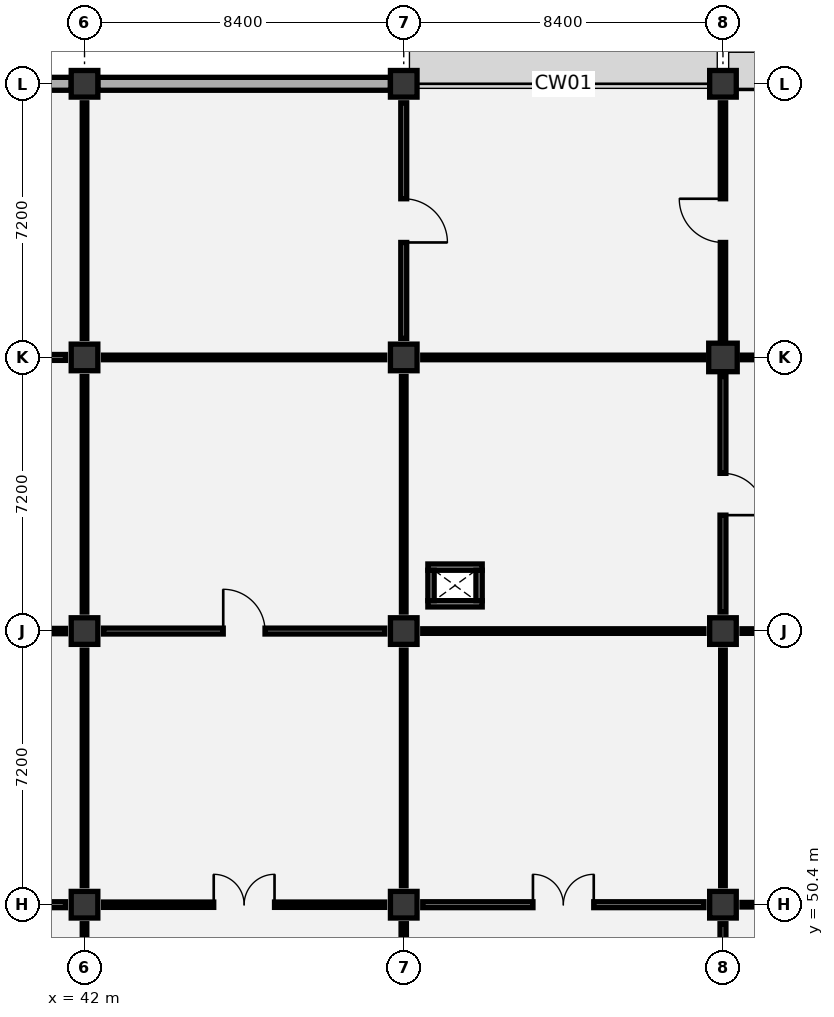
"""IFC4 building model, lengths in metres.
Left out: names, types, materials, properties, quantities, classifications, styles, units other than length and angle.
Written with IfcOpenShell. Run it as: python <this file> out.ifc"""

import sys

from ifc_helpers import new_model, si_unit, direction, frame, frame_2d, origin, origin_2d, place, context, subcontext, project, spatial, rectangle, circle, extrude, element, fill, save


model = new_model("IFC4")
c1 = context("Model", 3, precision=1e-05, world=origin(), true_north=direction((0.0, 1.0)))
c2 = subcontext(c1, "Body", "Model", "MODEL_VIEW")
j1 = project(units=[si_unit("LENGTHUNIT", "METRE"), si_unit("PLANEANGLEUNIT", "RADIAN")], contexts=[c1])
p1 = place(None, origin())
s1 = spatial("IfcSite", under=j1, at=p1, CompositionType="ELEMENT")
p2 = place(p1, origin())
s2 = spatial("IfcBuilding", under=s1, at=p2, CompositionType="ELEMENT")
p3 = place(p2, origin())
s3 = spatial("IfcBuildingStorey", under=s2, at=p3, CompositionType="ELEMENT", Elevation=0.0)
for number, where, z_axis, x_axis in (
    (1, (42.0, 50.4, 0.0), (0.0, 0.0, 1.0), (1.0, 0.0, 0.0)),
    (2, (42.0, 57.6, 0.0), (0.0, 0.0, 1.0), (1.0, 0.0, 0.0)),
    (3, (42.0, 64.8, 0.0), (0.0, 0.0, 1.0), (1.0, 0.0, 0.0)),
    (4, (42.0, 72.0, 0.0), (0.0, 0.0, 1.0), (1.0, 0.0, 0.0)),
    (5, (50.4, 50.4, 0.0), (0.0, 0.0, 1.0), (1.0, 0.0, 0.0)),
    (6, (50.4, 57.6, 0.0), (0.0, 0.0, 1.0), (1.0, 0.0, 0.0)),
    (7, (50.4, 64.8, 0.0), (0.0, 0.0, 1.0), (1.0, 0.0, 0.0)),
    (8, (50.4, 72.0, 0.0), (0.0, 0.0, 1.0), (1.0, 0.0, 0.0)),
    (9, (58.8, 50.4, 0.0), (0.0, 0.0, 1.0), (1.0, 0.0, 0.0)),
    (10, (58.8, 57.6, 0.0), (0.0, 0.0, 1.0), (1.0, 0.0, 0.0)),
):
    element("IfcColumn", number, at=place(p3, frame(where, z_axis=z_axis, x_axis=x_axis)), inside=s3, PredefinedType="COLUMN", context=c2, shape_type="SweptSolid", body=[
        extrude(rectangle(XDim=0.7, YDim=0.7, at=origin_2d()), origin(), (0.0, 0.0, 1.0), 6.0),
    ])
p4 = place(p3, frame((58.8, 64.8, 0.0), z_axis=(0.0, 0.0, 1.0), x_axis=(1.0, 0.0, 0.0)))
e11 = element("IfcColumn", 11, at=p4, inside=s3, PredefinedType="COLUMN", context=c2, shape_type="SweptSolid", body=[
    extrude(circle(Radius=0.375, at=origin_2d()), origin(), (0.0, 0.0, 1.0), 6.0),
])
p5 = place(p3, frame((58.8, 72.0, 0.0), z_axis=(0.0, 0.0, 1.0), x_axis=(1.0, 0.0, 0.0)))
e12 = element("IfcColumn", 12, at=p5, inside=s3, PredefinedType="COLUMN", context=c2, shape_type="SweptSolid", body=[
    extrude(rectangle(XDim=0.7, YDim=0.7, at=origin_2d()), origin(), (0.0, 0.0, 1.0), 6.0),
])
for number, where, z_axis, x_axis in (
    (13, (33.95, 72.0, 0.0), (0.0, 0.0, 1.0), (1.0, 0.0, 0.0)),
    (14, (42.35, 72.0, 0.0), (0.0, 0.0, 1.0), (1.0, 0.0, 0.0)),
):
    element("IfcWall", number, at=place(p3, frame(where, z_axis=z_axis, x_axis=x_axis)), inside=s3, PredefinedType="SOLIDWALL", context=c2, shape_type="SweptSolid", body=[
        extrude(rectangle(XDim=7.7, YDim=0.34, at=frame_2d((3.85, 0.0))), origin(), (0.0, 0.0, 1.0), 5.02),
    ])
p6 = place(p3, frame((59.15, 72.0, 0.0), z_axis=(0.0, 0.0, 1.0), x_axis=(1.0, 0.0, 0.0)))
e15 = element("IfcWall", 15, at=p6, inside=s3, PredefinedType="SOLIDWALL", context=c2, shape_type="SweptSolid", body=[
    extrude(rectangle(XDim=7.6, YDim=0.25, at=frame_2d((3.8, 0.0))), origin(), (0.0, 0.0, 1.0), 5.02),
])
p7 = place(p6, frame((2.9, 0.0, 0.0)))
e16 = element("IfcOpeningElement", 16, at=p7, cuts=e15, PredefinedType="OPENING", context=c2, shape_type="SweptSolid", body=[
    extrude(rectangle(XDim=1.8, YDim=2.35, at=frame_2d((0.9, 1.175))), frame((0.0, 0.135, 0.0), z_axis=(0.0, -1.0, 0.0), x_axis=(1.0, 0.0, 0.0)), (0.0, 0.0, 1.0), 0.27),
])
for number, where, z_axis, x_axis in (
    (17, (51.035, 58.317, 0.0), (0.0, 0.0, 1.0), (1.0, 0.0, 0.0)),
    (18, (51.035, 59.282, 0.0), (0.0, 0.0, 1.0), (1.0, 0.0, 0.0)),
):
    element("IfcWall", number, at=place(p3, frame(where, z_axis=z_axis, x_axis=x_axis)), inside=s3, PredefinedType="PARTITIONING", context=c2, shape_type="SweptSolid", body=[
        extrude(rectangle(XDim=1.43, YDim=0.165, at=frame_2d((0.715, 0.0))), origin(), (0.0, 0.0, 1.0), 5.675),
    ])
for number, where, z_axis, x_axis in (
    (19, (51.117, 58.4, 0.0), (0.0, 0.0, 1.0), (0.0, 1.0, 0.0)),
    (20, (52.383, 58.4, 0.0), (0.0, 0.0, 1.0), (0.0, 1.0, 0.0)),
):
    element("IfcWall", number, at=place(p3, frame(where, z_axis=z_axis, x_axis=x_axis)), inside=s3, PredefinedType="PARTITIONING", context=c2, shape_type="SweptSolid", body=[
        extrude(rectangle(XDim=0.8, YDim=0.165, at=frame_2d((0.4, 0.0))), origin(), (0.0, 0.0, 1.0), 5.675),
    ])
p8 = place(p3, frame((42.0, 43.7, 0.0), z_axis=(0.0, 0.0, 1.0), x_axis=(0.0, 1.0, 0.0)))
e21 = element("IfcWall", 21, at=p8, inside=s3, PredefinedType="PARTITIONING", context=c2, shape_type="SweptSolid", body=[
    extrude(rectangle(XDim=6.2, YDim=0.12, at=frame_2d((3.1, 0.0))), origin(), (0.0, 0.0, 1.0), 4.92),
])
p9 = place(p3, frame((34.1, 50.4, 0.0), z_axis=(0.0, 0.0, 1.0), x_axis=(1.0, 0.0, 0.0)))
e22 = element("IfcWall", 22, at=p9, inside=s3, PredefinedType="PARTITIONING", context=c2, shape_type="SweptSolid", body=[
    extrude(rectangle(XDim=7.4, YDim=0.155, at=frame_2d((3.7, 0.0))), origin(), (0.0, 0.0, 1.0), 4.87),
])
p10 = place(p9, frame((2.9, 0.0, 0.0)))
e23 = element("IfcOpeningElement", 23, at=p10, cuts=e22, PredefinedType="OPENING", context=c2, shape_type="SweptSolid", body=[
    extrude(rectangle(XDim=1.6, YDim=2.2, at=frame_2d((0.8, 1.1))), frame((0.0, 0.087, 0.0), z_axis=(0.0, -1.0, 0.0), x_axis=(1.0, 0.0, 0.0)), (0.0, 0.0, 1.0), 0.175),
])
p11 = place(p3, frame((42.0, 50.9, 0.0), z_axis=(0.0, 0.0, 1.0), x_axis=(0.0, 1.0, 0.0)))
e24 = element("IfcWall", 24, at=p11, inside=s3, PredefinedType="PARTITIONING", context=c2, shape_type="SweptSolid", body=[
    extrude(rectangle(XDim=6.2, YDim=0.12, at=frame_2d((3.1, 0.0))), origin(), (0.0, 0.0, 1.0), 5.27),
])
p12 = place(p3, frame((34.1, 57.6, 0.0), z_axis=(0.0, 0.0, 1.0), x_axis=(1.0, 0.0, 0.0)))
e25 = element("IfcWall", 25, at=p12, inside=s3, PredefinedType="PARTITIONING", context=c2, shape_type="SweptSolid", body=[
    extrude(rectangle(XDim=7.4, YDim=0.14, at=frame_2d((3.7, 0.0))), origin(), (0.0, 0.0, 1.0), 4.87),
])
p13 = place(p12, frame((3.15, 0.0, 0.0)))
e26 = element("IfcOpeningElement", 26, at=p13, cuts=e25, PredefinedType="OPENING", context=c2, shape_type="SweptSolid", body=[
    extrude(rectangle(XDim=1.1, YDim=2.1, at=frame_2d((0.55, 1.05))), frame((0.0, 0.08, 0.0), z_axis=(0.0, -1.0, 0.0), x_axis=(1.0, 0.0, 0.0)), (0.0, 0.0, 1.0), 0.16),
])
p14 = place(p3, frame((42.0, 58.1, 0.0), z_axis=(0.0, 0.0, 1.0), x_axis=(0.0, 1.0, 0.0)))
e27 = element("IfcWall", 27, at=p14, inside=s3, PredefinedType="PARTITIONING", context=c2, shape_type="SweptSolid", body=[
    extrude(rectangle(XDim=6.2, YDim=0.12, at=frame_2d((3.1, 0.0))), origin(), (0.0, 0.0, 1.0), 4.92),
])
p15 = place(p3, frame((34.1, 64.8, 0.0), z_axis=(0.0, 0.0, 1.0), x_axis=(1.0, 0.0, 0.0)))
e28 = element("IfcWall", 28, at=p15, inside=s3, PredefinedType="PARTITIONING", context=c2, shape_type="SweptSolid", body=[
    extrude(rectangle(XDim=7.4, YDim=0.155, at=frame_2d((3.7, 0.0))), origin(), (0.0, 0.0, 1.0), 4.87),
])
p16 = place(p15, frame((3.125, 0.0, 0.0)))
e29 = element("IfcOpeningElement", 29, at=p16, cuts=e28, PredefinedType="OPENING", context=c2, shape_type="SweptSolid", body=[
    extrude(rectangle(XDim=1.15, YDim=2.1, at=frame_2d((0.575, 1.05))), frame((0.0, 0.087, 0.0), z_axis=(0.0, -1.0, 0.0), x_axis=(1.0, 0.0, 0.0)), (0.0, 0.0, 1.0), 0.175),
])
p17 = place(p3, frame((42.0, 65.3, 0.0), z_axis=(0.0, 0.0, 1.0), x_axis=(0.0, 1.0, 0.0)))
e30 = element("IfcWall", 30, at=p17, inside=s3, PredefinedType="PARTITIONING", context=c2, shape_type="SweptSolid", body=[
    extrude(rectangle(XDim=6.2, YDim=0.12, at=frame_2d((3.1, 0.0))), origin(), (0.0, 0.0, 1.0), 5.38),
])
p18 = place(p3, frame((50.4, 43.7, 0.0), z_axis=(0.0, 0.0, 1.0), x_axis=(0.0, 1.0, 0.0)))
e31 = element("IfcWall", 31, at=p18, inside=s3, PredefinedType="PARTITIONING", context=c2, shape_type="SweptSolid", body=[
    extrude(rectangle(XDim=6.2, YDim=0.14, at=frame_2d((3.1, 0.0))), origin(), (0.0, 0.0, 1.0), 5.27),
])
p19 = place(p18, frame((2.2, 0.0, 0.0)))
e32 = element("IfcOpeningElement", 32, at=p19, cuts=e31, PredefinedType="OPENING", context=c2, shape_type="SweptSolid", body=[
    extrude(rectangle(XDim=1.8, YDim=2.25, at=frame_2d((0.9, 1.125))), frame((0.0, 0.08, 0.0), z_axis=(0.0, -1.0, 0.0), x_axis=(1.0, 0.0, 0.0)), (0.0, 0.0, 1.0), 0.16),
])
p20 = place(p3, frame((42.5, 50.4, 0.0), z_axis=(0.0, 0.0, 1.0), x_axis=(1.0, 0.0, 0.0)))
e33 = element("IfcWall", 33, at=p20, inside=s3, PredefinedType="PARTITIONING", context=c2, shape_type="SweptSolid", body=[
    extrude(rectangle(XDim=7.4, YDim=0.14, at=frame_2d((3.7, 0.0))), origin(), (0.0, 0.0, 1.0), 4.87),
])
p21 = place(p20, frame((2.9, 0.0, 0.0)))
e34 = element("IfcOpeningElement", 34, at=p21, cuts=e33, PredefinedType="OPENING", context=c2, shape_type="SweptSolid", body=[
    extrude(rectangle(XDim=1.6, YDim=2.2, at=frame_2d((0.8, 1.1))), frame((0.0, 0.08, 0.0), z_axis=(0.0, -1.0, 0.0), x_axis=(1.0, 0.0, 0.0)), (0.0, 0.0, 1.0), 0.16),
])
p22 = place(p3, frame((50.4, 50.9, 0.0), z_axis=(0.0, 0.0, 1.0), x_axis=(0.0, 1.0, 0.0)))
e35 = element("IfcWall", 35, at=p22, inside=s3, PredefinedType="PARTITIONING", context=c2, shape_type="SweptSolid", body=[
    extrude(rectangle(XDim=6.2, YDim=0.12, at=frame_2d((3.1, 0.0))), origin(), (0.0, 0.0, 1.0), 4.92),
])
p23 = place(p3, frame((42.5, 57.6, 0.0), z_axis=(0.0, 0.0, 1.0), x_axis=(1.0, 0.0, 0.0)))
e36 = element("IfcWall", 36, at=p23, inside=s3, PredefinedType="PARTITIONING", context=c2, shape_type="SweptSolid", body=[
    extrude(rectangle(XDim=7.4, YDim=0.155, at=frame_2d((3.7, 0.0))), origin(), (0.0, 0.0, 1.0), 4.87),
])
p24 = place(p23, frame((3.15, 0.0, 0.0)))
e37 = element("IfcOpeningElement", 37, at=p24, cuts=e36, PredefinedType="OPENING", context=c2, shape_type="SweptSolid", body=[
    extrude(rectangle(XDim=1.1, YDim=2.1, at=frame_2d((0.55, 1.05))), frame((0.0, 0.087, 0.0), z_axis=(0.0, -1.0, 0.0), x_axis=(1.0, 0.0, 0.0)), (0.0, 0.0, 1.0), 0.175),
])
p25 = place(p3, frame((50.4, 58.1, 0.0), z_axis=(0.0, 0.0, 1.0), x_axis=(0.0, 1.0, 0.0)))
e38 = element("IfcWall", 38, at=p25, inside=s3, PredefinedType="PARTITIONING", context=c2, shape_type="SweptSolid", body=[
    extrude(rectangle(XDim=6.2, YDim=0.12, at=frame_2d((3.1, 0.0))), origin(), (0.0, 0.0, 1.0), 5.38),
])
p26 = place(p3, frame((42.5, 64.8, 0.0), z_axis=(0.0, 0.0, 1.0), x_axis=(1.0, 0.0, 0.0)))
e39 = element("IfcWall", 39, at=p26, inside=s3, PredefinedType="PARTITIONING", context=c2, shape_type="SweptSolid", body=[
    extrude(rectangle(XDim=7.4, YDim=0.12, at=frame_2d((3.7, 0.0))), origin(), (0.0, 0.0, 1.0), 4.87),
])
p27 = place(p3, frame((50.4, 65.3, 0.0), z_axis=(0.0, 0.0, 1.0), x_axis=(0.0, 1.0, 0.0)))
e40 = element("IfcWall", 40, at=p27, inside=s3, PredefinedType="PARTITIONING", context=c2, shape_type="SweptSolid", body=[
    extrude(rectangle(XDim=6.2, YDim=0.155, at=frame_2d((3.1, 0.0))), origin(), (0.0, 0.0, 1.0), 4.92),
])
p28 = place(p27, frame((2.525, 0.0, 0.0)))
e41 = element("IfcOpeningElement", 41, at=p28, cuts=e40, PredefinedType="OPENING", context=c2, shape_type="SweptSolid", body=[
    extrude(rectangle(XDim=1.15, YDim=2.1, at=frame_2d((0.575, 1.05))), frame((0.0, 0.087, 0.0), z_axis=(0.0, -1.0, 0.0), x_axis=(1.0, 0.0, 0.0)), (0.0, 0.0, 1.0), 0.175),
])
p29 = place(p3, frame((58.8, 43.7, 0.0), z_axis=(0.0, 0.0, 1.0), x_axis=(0.0, 1.0, 0.0)))
e42 = element("IfcWall", 42, at=p29, inside=s3, PredefinedType="PARTITIONING", context=c2, shape_type="SweptSolid", body=[
    extrude(rectangle(XDim=6.2, YDim=0.155, at=frame_2d((3.1, 0.0))), origin(), (0.0, 0.0, 1.0), 4.92),
])
p30 = place(p29, frame((2.2, 0.0, 0.0)))
e43 = element("IfcOpeningElement", 43, at=p30, cuts=e42, PredefinedType="OPENING", context=c2, shape_type="SweptSolid", body=[
    extrude(rectangle(XDim=1.8, YDim=2.25, at=frame_2d((0.9, 1.125))), frame((0.0, 0.087, 0.0), z_axis=(0.0, -1.0, 0.0), x_axis=(1.0, 0.0, 0.0)), (0.0, 0.0, 1.0), 0.175),
])
p31 = place(p3, frame((50.9, 50.4, 0.0), z_axis=(0.0, 0.0, 1.0), x_axis=(1.0, 0.0, 0.0)))
e44 = element("IfcWall", 44, at=p31, inside=s3, PredefinedType="PARTITIONING", context=c2, shape_type="SweptSolid", body=[
    extrude(rectangle(XDim=7.4, YDim=0.155, at=frame_2d((3.7, 0.0))), origin(), (0.0, 0.0, 1.0), 4.87),
])
p32 = place(p31, frame((2.9, 0.0, 0.0)))
e45 = element("IfcOpeningElement", 45, at=p32, cuts=e44, PredefinedType="OPENING", context=c2, shape_type="SweptSolid", body=[
    extrude(rectangle(XDim=1.6, YDim=2.2, at=frame_2d((0.8, 1.1))), frame((0.0, 0.087, 0.0), z_axis=(0.0, -1.0, 0.0), x_axis=(1.0, 0.0, 0.0)), (0.0, 0.0, 1.0), 0.175),
])
p33 = place(p3, frame((58.8, 50.9, 0.0), z_axis=(0.0, 0.0, 1.0), x_axis=(0.0, 1.0, 0.0)))
e46 = element("IfcWall", 46, at=p33, inside=s3, PredefinedType="PARTITIONING", context=c2, shape_type="SweptSolid", body=[
    extrude(rectangle(XDim=6.2, YDim=0.12, at=frame_2d((3.1, 0.0))), origin(), (0.0, 0.0, 1.0), 5.38),
])
p34 = place(p3, frame((50.9, 57.6, 0.0), z_axis=(0.0, 0.0, 1.0), x_axis=(1.0, 0.0, 0.0)))
e47 = element("IfcWall", 47, at=p34, inside=s3, PredefinedType="PARTITIONING", context=c2, shape_type="SweptSolid", body=[
    extrude(rectangle(XDim=7.4, YDim=0.12, at=frame_2d((3.7, 0.0))), origin(), (0.0, 0.0, 1.0), 4.87),
])
p35 = place(p3, frame((58.8, 58.1, 0.0), z_axis=(0.0, 0.0, 1.0), x_axis=(0.0, 1.0, 0.0)))
e48 = element("IfcWall", 48, at=p35, inside=s3, PredefinedType="PARTITIONING", context=c2, shape_type="SweptSolid", body=[
    extrude(rectangle(XDim=6.2, YDim=0.155, at=frame_2d((3.1, 0.0))), origin(), (0.0, 0.0, 1.0), 4.92),
])
p36 = place(p35, frame((2.55, 0.0, 0.0)))
e49 = element("IfcOpeningElement", 49, at=p36, cuts=e48, PredefinedType="OPENING", context=c2, shape_type="SweptSolid", body=[
    extrude(rectangle(XDim=1.1, YDim=2.1, at=frame_2d((0.55, 1.05))), frame((0.0, 0.087, 0.0), z_axis=(0.0, -1.0, 0.0), x_axis=(1.0, 0.0, 0.0)), (0.0, 0.0, 1.0), 0.175),
])
p37 = place(p3, frame((50.9, 64.8, 0.0), z_axis=(0.0, 0.0, 1.0), x_axis=(1.0, 0.0, 0.0)))
e50 = element("IfcWall", 50, at=p37, inside=s3, PredefinedType="PARTITIONING", context=c2, shape_type="SweptSolid", body=[
    extrude(rectangle(XDim=7.4, YDim=0.12, at=frame_2d((3.7, 0.0))), origin(), (0.0, 0.0, 1.0), 4.87),
])
p38 = place(p3, frame((58.8, 65.3, 0.0), z_axis=(0.0, 0.0, 1.0), x_axis=(0.0, 1.0, 0.0)))
e51 = element("IfcWall", 51, at=p38, inside=s3, PredefinedType="PARTITIONING", context=c2, shape_type="SweptSolid", body=[
    extrude(rectangle(XDim=6.2, YDim=0.14, at=frame_2d((3.1, 0.0))), origin(), (0.0, 0.0, 1.0), 5.17),
])
p39 = place(p38, frame((2.525, 0.0, 0.0)))
e52 = element("IfcOpeningElement", 52, at=p39, cuts=e51, PredefinedType="OPENING", context=c2, shape_type="SweptSolid", body=[
    extrude(rectangle(XDim=1.15, YDim=2.1, at=frame_2d((0.575, 1.05))), frame((0.0, 0.08, 0.0), z_axis=(0.0, -1.0, 0.0), x_axis=(1.0, 0.0, 0.0)), (0.0, 0.0, 1.0), 0.16),
])
for number, where, z_axis, x_axis in (
    (53, (59.3, 50.4, 0.0), (0.0, 0.0, 1.0), (1.0, 0.0, 0.0)),
    (54, (59.3, 57.6, 0.0), (0.0, 0.0, 1.0), (1.0, 0.0, 0.0)),
    (55, (59.3, 64.8, 0.0), (0.0, 0.0, 1.0), (1.0, 0.0, 0.0)),
):
    element("IfcWall", number, at=place(p3, frame(where, z_axis=z_axis, x_axis=x_axis)), inside=s3, PredefinedType="PARTITIONING", context=c2, shape_type="SweptSolid", body=[
        extrude(rectangle(XDim=7.4, YDim=0.12, at=frame_2d((3.7, 0.0))), origin(), (0.0, 0.0, 1.0), 4.87),
    ])
p40 = place(p21, origin())
e56 = element("IfcDoor", 56, at=p40, inside=s3, OperationType="DOUBLE_DOOR_SINGLE_SWING", PredefinedType="DOOR", context=c2, shape_type="SweptSolid", body=[
    extrude(rectangle(XDim=1.6, YDim=2.2, at=frame_2d((0.8, 1.1))), frame((0.0, 0.025, 0.0), z_axis=(0.0, -1.0, 0.0), x_axis=(1.0, 0.0, 0.0)), (0.0, 0.0, 1.0), 0.05),
])
fill(e34, e56)
p41 = place(p24, origin())
e57 = element("IfcDoor", 57, at=p41, inside=s3, OperationType="SINGLE_SWING_LEFT", PredefinedType="DOOR", context=c2, shape_type="SweptSolid", body=[
    extrude(rectangle(XDim=1.1, YDim=2.1, at=frame_2d((0.55, 1.05))), frame((0.0, 0.025, 0.0), z_axis=(0.0, -1.0, 0.0), x_axis=(1.0, 0.0, 0.0)), (0.0, 0.0, 1.0), 0.05),
])
fill(e37, e57)
p42 = place(p28, frame((1.15, 0.0, 0.0), z_axis=(0.0, 0.0, 1.0), x_axis=(-1.0, 0.0, 0.0)))
e58 = element("IfcDoor", 58, at=p42, inside=s3, OperationType="SINGLE_SWING_RIGHT", PredefinedType="DOOR", context=c2, shape_type="SweptSolid", body=[
    extrude(rectangle(XDim=1.15, YDim=2.1, at=frame_2d((0.575, 1.05))), frame((0.0, 0.025, 0.0), z_axis=(0.0, -1.0, 0.0), x_axis=(1.0, 0.0, 0.0)), (0.0, 0.0, 1.0), 0.05),
])
fill(e41, e58)
p43 = place(p32, origin())
e59 = element("IfcDoor", 59, at=p43, inside=s3, OperationType="DOUBLE_DOOR_SINGLE_SWING", PredefinedType="DOOR", context=c2, shape_type="SweptSolid", body=[
    extrude(rectangle(XDim=1.6, YDim=2.2, at=frame_2d((0.8, 1.1))), frame((0.0, 0.025, 0.0), z_axis=(0.0, -1.0, 0.0), x_axis=(1.0, 0.0, 0.0)), (0.0, 0.0, 1.0), 0.05),
])
fill(e45, e59)
p44 = place(p36, frame((1.1, 0.0, 0.0), z_axis=(0.0, 0.0, 1.0), x_axis=(-1.0, 0.0, 0.0)))
e60 = element("IfcDoor", 60, at=p44, inside=s3, OperationType="SINGLE_SWING_RIGHT", PredefinedType="DOOR", context=c2, shape_type="SweptSolid", body=[
    extrude(rectangle(XDim=1.1, YDim=2.1, at=frame_2d((0.55, 1.05))), frame((0.0, 0.025, 0.0), z_axis=(0.0, -1.0, 0.0), x_axis=(1.0, 0.0, 0.0)), (0.0, 0.0, 1.0), 0.05),
])
fill(e49, e60)
p45 = place(p39, origin())
e61 = element("IfcDoor", 61, at=p45, inside=s3, OperationType="SINGLE_SWING_RIGHT", PredefinedType="DOOR", context=c2, shape_type="SweptSolid", body=[
    extrude(rectangle(XDim=1.15, YDim=2.1, at=frame_2d((0.575, 1.05))), frame((0.0, 0.025, 0.0), z_axis=(0.0, -1.0, 0.0), x_axis=(1.0, 0.0, 0.0)), (0.0, 0.0, 1.0), 0.05),
])
fill(e52, e61)
save(model, sys.argv[1])
